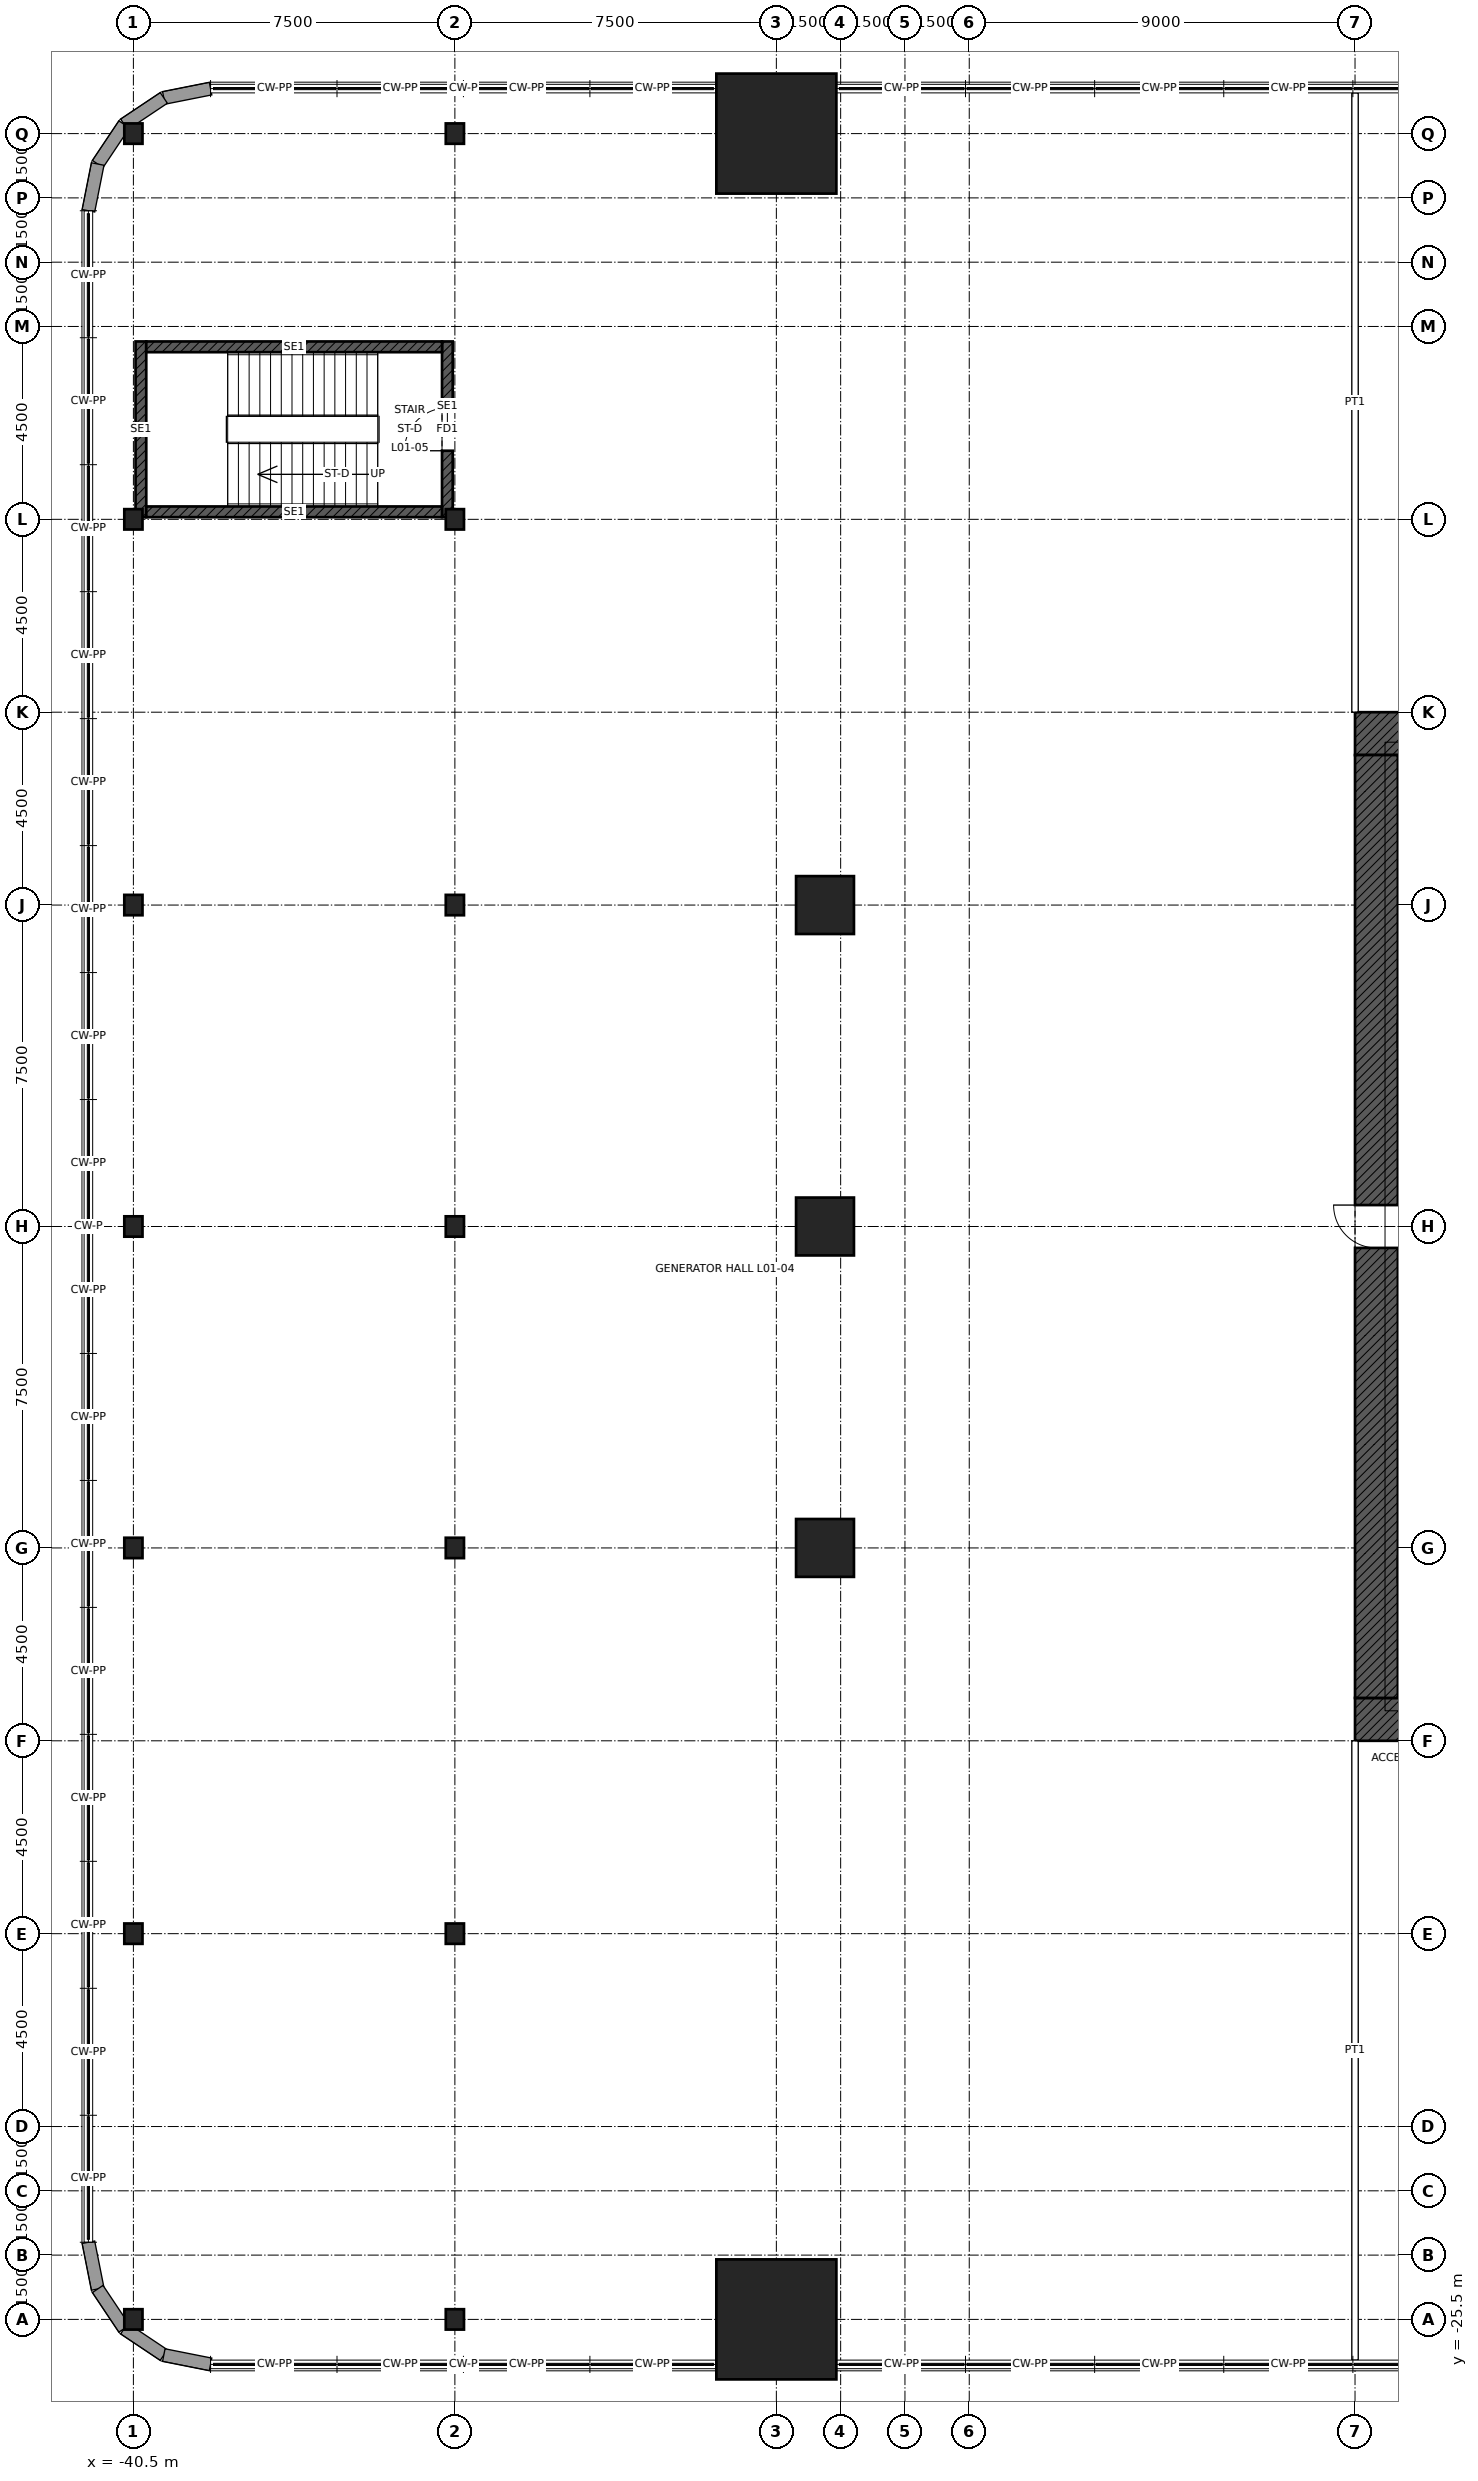
"""IFC4 building model, lengths in metres.
Left out: names, types, materials, properties, quantities, classifications, styles, units other than length and angle.
Written with IfcOpenShell. Run it as: python <this file> out.ifc"""

import sys

from ifc_helpers import new_model, si_unit, direction, frame, frame_2d, origin, origin_2d, place, context, subcontext, project, spatial, rectangle, hollow_rectangle, i_section, extrude, element, fill, save


model = new_model("IFC4")
c1 = context("Model", 3, precision=1e-05, world=origin(), true_north=direction((0.0, 1.0)))
c2 = subcontext(c1, "Body", "Model", "MODEL_VIEW")
j1 = project(units=[si_unit("LENGTHUNIT", "METRE"), si_unit("PLANEANGLEUNIT", "RADIAN")], contexts=[c1])
p1 = place(None, origin())
s1 = spatial("IfcSite", under=j1, at=p1, CompositionType="ELEMENT")
p2 = place(p1, origin())
s2 = spatial("IfcBuilding", under=s1, at=p2, CompositionType="ELEMENT")
p3 = place(p2, frame((0.0, 0.0, 7.2)))
s3 = spatial("IfcBuildingStorey", under=s2, at=p3, CompositionType="ELEMENT", Elevation=7.2)
for number, where, z_axis, x_axis in (
    (1, (-25.5, -25.5, 0.0), (0.0, 0.0, 1.0), (1.0, 0.0, 0.0)),
    (2, (-25.5, 25.5, 0.0), (0.0, 0.0, 1.0), (1.0, 0.0, 0.0)),
):
    element("IfcColumn", number, at=place(p3, frame(where, z_axis=z_axis, x_axis=x_axis)), inside=s3, PredefinedType="COLUMN", context=c2, shape_type="SweptSolid", body=[
        extrude(hollow_rectangle(XDim=2.8, YDim=2.8, WallThickness=0.14, at=origin_2d()), origin(), (0.0, 0.0, 1.0), 5.4),
    ])
for number, where, z_axis, x_axis in (
    (3, (-24.365, -7.5, 0.0), (0.0, 0.0, 1.0), (1.0, 0.0, 0.0)),
    (4, (-24.365, 0.0, 0.0), (0.0, 0.0, 1.0), (1.0, 0.0, 0.0)),
    (5, (-24.365, 7.5, 0.0), (0.0, 0.0, 1.0), (1.0, 0.0, 0.0)),
):
    element("IfcColumn", number, at=place(p3, frame(where, z_axis=z_axis, x_axis=x_axis)), inside=s3, PredefinedType="COLUMN", context=c2, shape_type="SweptSolid", body=[
        extrude(hollow_rectangle(XDim=1.35, YDim=1.35, WallThickness=0.1, at=origin_2d()), origin(), (0.0, 0.0, 1.0), 5.4),
    ])
for number, where, z_axis, x_axis in (
    (6, (-33.0, -25.5, 0.0), (0.0, 0.0, 1.0), (1.0, 0.0, 0.0)),
    (7, (-33.0, -16.5, 0.0), (0.0, 0.0, 1.0), (1.0, 0.0, 0.0)),
    (8, (-33.0, -7.5, 0.0), (0.0, 0.0, 1.0), (1.0, 0.0, 0.0)),
    (9, (-33.0, 0.0, 0.0), (0.0, 0.0, 1.0), (1.0, 0.0, 0.0)),
    (10, (-33.0, 7.5, 0.0), (0.0, 0.0, 1.0), (1.0, 0.0, 0.0)),
    (11, (-33.0, 16.5, 0.0), (0.0, 0.0, 1.0), (1.0, 0.0, 0.0)),
    (12, (-33.0, 25.5, 0.0), (0.0, 0.0, 1.0), (1.0, 0.0, 0.0)),
    (13, (-40.5, -25.5, 0.0), (0.0, 0.0, 1.0), (1.0, 0.0, 0.0)),
    (14, (-40.5, -16.5, 0.0), (0.0, 0.0, 1.0), (1.0, 0.0, 0.0)),
    (15, (-40.5, -7.5, 0.0), (0.0, 0.0, 1.0), (1.0, 0.0, 0.0)),
    (16, (-40.5, 0.0, 0.0), (0.0, 0.0, 1.0), (1.0, 0.0, 0.0)),
    (17, (-40.5, 7.5, 0.0), (0.0, 0.0, 1.0), (1.0, 0.0, 0.0)),
    (18, (-40.5, 16.5, 0.0), (0.0, 0.0, 1.0), (1.0, 0.0, 0.0)),
    (19, (-40.5, 25.5, 0.0), (0.0, 0.0, 1.0), (1.0, 0.0, 0.0)),
):
    element("IfcColumn", number, at=place(p3, frame(where, z_axis=z_axis, x_axis=x_axis)), inside=s3, PredefinedType="COLUMN", context=c2, shape_type="SweptSolid", body=[
        extrude(i_section(OverallWidth=0.424, OverallDepth=0.475, WebThickness=0.048, FlangeThickness=0.077, at=origin_2d()), origin(), (0.0, 0.0, 1.0), 5.4),
    ])
p4 = place(p3, frame((-12.0, 11.5, 0.0), z_axis=(0.0, 0.0, 1.0), x_axis=(1.0, 0.0, 0.0)))
e20 = element("IfcWall", 20, at=p4, inside=s3, PredefinedType="SHEAR", context=c2, shape_type="SweptSolid", body=[
    extrude(rectangle(XDim=24.0, YDim=1.0, at=frame_2d((12.0, 0.0))), origin(), (0.0, 0.0, 1.0), 5.4),
])
p5 = place(p4, frame((6.25, 0.0, 0.0)))
e21 = element("IfcOpeningElement", 21, at=p5, cuts=e20, PredefinedType="OPENING", context=c2, shape_type="SweptSolid", body=[
    extrude(rectangle(XDim=1.0, YDim=2.4, at=frame_2d((0.5, 1.2))), frame((0.0, 0.51, 0.0), z_axis=(0.0, -1.0, 0.0), x_axis=(1.0, 0.0, 0.0)), (0.0, 0.0, 1.0), 1.02),
])
p6 = place(p4, frame((16.75, 0.0, 0.0)))
e22 = element("IfcOpeningElement", 22, at=p6, cuts=e20, PredefinedType="OPENING", context=c2, shape_type="SweptSolid", body=[
    extrude(rectangle(XDim=1.0, YDim=2.4, at=frame_2d((0.5, 1.2))), frame((0.0, 0.51, 0.0), z_axis=(0.0, -1.0, 0.0), x_axis=(1.0, 0.0, 0.0)), (0.0, 0.0, 1.0), 1.02),
])
p7 = place(p3, frame((12.0, -11.5, 0.0), z_axis=(0.0, 0.0, 1.0), x_axis=(-1.0, 0.0, 0.0)))
e23 = element("IfcWall", 23, at=p7, inside=s3, PredefinedType="SHEAR", context=c2, shape_type="SweptSolid", body=[
    extrude(rectangle(XDim=24.0, YDim=1.0, at=frame_2d((12.0, 0.0))), origin(), (0.0, 0.0, 1.0), 5.4),
])
p8 = place(p7, frame((11.5, 0.0, 0.0)))
e24 = element("IfcOpeningElement", 24, at=p8, cuts=e23, PredefinedType="OPENING", context=c2, shape_type="SweptSolid", body=[
    extrude(rectangle(XDim=1.0, YDim=2.1, at=frame_2d((0.5, 1.05))), frame((0.0, 0.51, 0.0), z_axis=(0.0, -1.0, 0.0), x_axis=(1.0, 0.0, 0.0)), (0.0, 0.0, 1.0), 1.02),
])
p9 = place(p7, frame((1.0, 0.0, 0.0)))
e25 = element("IfcOpeningElement", 25, at=p9, cuts=e23, PredefinedType="OPENING", context=c2, shape_type="SweptSolid", body=[
    extrude(rectangle(XDim=1.0, YDim=2.4, at=frame_2d((0.5, 1.2))), frame((0.0, 0.51, 0.0), z_axis=(0.0, -1.0, 0.0), x_axis=(1.0, 0.0, 0.0)), (0.0, 0.0, 1.0), 1.02),
])
p10 = place(p3, frame((-11.5, -11.0, 0.0), z_axis=(0.0, 0.0, 1.0), x_axis=(0.0, 1.0, 0.0)))
e26 = element("IfcWall", 26, at=p10, inside=s3, PredefinedType="SHEAR", context=c2, shape_type="SweptSolid", body=[
    extrude(rectangle(XDim=22.0, YDim=1.0, at=frame_2d((11.0, 0.0))), origin(), (0.0, 0.0, 1.0), 5.4),
])
p11 = place(p10, frame((10.5, 0.0, 0.0)))
e27 = element("IfcOpeningElement", 27, at=p11, cuts=e26, PredefinedType="OPENING", context=c2, shape_type="SweptSolid", body=[
    extrude(rectangle(XDim=1.0, YDim=2.4, at=frame_2d((0.5, 1.2))), frame((0.0, 0.51, 0.0), z_axis=(0.0, -1.0, 0.0), x_axis=(1.0, 0.0, 0.0)), (0.0, 0.0, 1.0), 1.02),
])
for number, where, z_axis, x_axis in (
    (28, (-38.7, 26.55, 0.0), (0.0, 0.0, 1.0), (-0.981, -0.195, 0.0)),
    (29, (-39.791, 26.333, 0.0), (0.0, 0.0, 1.0), (-0.832, -0.555, 0.0)),
    (30, (-40.715, 25.715, 0.0), (0.0, 0.0, 1.0), (-0.555, -0.832, 0.0)),
    (31, (-41.333, 24.791, 0.0), (0.0, 0.0, 1.0), (-0.195, -0.981, 0.0)),
    (32, (-41.55, -23.7, 0.0), (0.0, 0.0, 1.0), (0.195, -0.981, 0.0)),
    (33, (-41.333, -24.791, 0.0), (0.0, 0.0, 1.0), (0.555, -0.832, 0.0)),
    (34, (-40.715, -25.715, 0.0), (0.0, 0.0, 1.0), (0.832, -0.555, 0.0)),
    (35, (-39.791, -26.333, 0.0), (0.0, 0.0, 1.0), (0.981, -0.195, 0.0)),
):
    element("IfcWall", number, at=place(p3, frame(where, z_axis=z_axis, x_axis=x_axis)), inside=s3, PredefinedType="SOLIDWALL", context=c2, shape_type="SweptSolid", body=[
        extrude(rectangle(XDim=1.112, YDim=0.3, at=frame_2d((0.556, 0.0))), origin(), (0.0, 0.0, 1.0), 5.15),
    ])
p12 = place(p3, frame((-12.0, 12.0, 0.0), z_axis=(0.0, 0.0, 1.0), x_axis=(0.0, 1.0, 0.0)))
e36 = element("IfcWall", 36, at=p12, inside=s3, PredefinedType="PARTITIONING", context=c2, shape_type="SweptSolid", body=[
    extrude(rectangle(XDim=14.45, YDim=0.15, at=frame_2d((7.225, 0.0))), origin(), (0.0, 0.0, 1.0), 4.109),
])
p13 = place(p3, frame((-12.0, -12.0, 0.0), z_axis=(0.0, 0.0, 1.0), x_axis=(0.0, -1.0, 0.0)))
e37 = element("IfcWall", 37, at=p13, inside=s3, PredefinedType="PARTITIONING", context=c2, shape_type="SweptSolid", body=[
    extrude(rectangle(XDim=14.45, YDim=0.15, at=frame_2d((7.225, 0.0))), origin(), (0.0, 0.0, 1.0), 5.15),
])
p14 = place(p3, frame((-40.325, 16.55, 0.0), z_axis=(0.0, 0.0, 1.0), x_axis=(0.0, 1.0, 0.0)))
e38 = element("IfcWall", 38, at=p14, inside=s3, PredefinedType="SOLIDWALL", context=c2, shape_type="SweptSolid", body=[
    extrude(rectangle(XDim=4.1, YDim=0.25, at=frame_2d((2.05, 0.0))), origin(), (0.0, 0.0, 1.0), 5.15),
])
p15 = place(p3, frame((-33.175, 16.55, 0.0), z_axis=(0.0, 0.0, 1.0), x_axis=(0.0, 1.0, 0.0)))
e39 = element("IfcWall", 39, at=p15, inside=s3, PredefinedType="SOLIDWALL", context=c2, shape_type="SweptSolid", body=[
    extrude(rectangle(XDim=4.1, YDim=0.25, at=frame_2d((2.05, 0.0))), origin(), (0.0, 0.0, 1.0), 5.15),
])
p16 = place(p15, frame((1.55, 0.0, 0.0)))
e40 = element("IfcOpeningElement", 40, at=p16, cuts=e39, PredefinedType="OPENING", context=c2, shape_type="SweptSolid", body=[
    extrude(rectangle(XDim=1.0, YDim=2.1, at=frame_2d((0.5, 1.05))), frame((0.0, 0.135, 0.0), z_axis=(0.0, -1.0, 0.0), x_axis=(1.0, 0.0, 0.0)), (0.0, 0.0, 1.0), 0.27),
])
for number, where, z_axis, x_axis in (
    (41, (-40.2, 16.675, 0.0), (0.0, 0.0, 1.0), (1.0, 0.0, 0.0)),
    (42, (-40.2, 20.525, 0.0), (0.0, 0.0, 1.0), (1.0, 0.0, 0.0)),
):
    element("IfcWall", number, at=place(p3, frame(where, z_axis=z_axis, x_axis=x_axis)), inside=s3, PredefinedType="SOLIDWALL", context=c2, shape_type="SweptSolid", body=[
        extrude(rectangle(XDim=6.9, YDim=0.25, at=frame_2d((3.45, 0.0))), origin(), (0.0, 0.0, 1.0), 5.15),
    ])
p17 = place(p11, origin())
e43 = element("IfcDoor", 43, at=p17, inside=s3, OperationType="SINGLE_SWING_RIGHT", PredefinedType="DOOR", context=c2, shape_type="SweptSolid", body=[
    extrude(rectangle(XDim=1.0, YDim=2.4, at=frame_2d((0.5, 1.2))), frame((0.0, 0.485, 0.0), z_axis=(0.0, -1.0, 0.0), x_axis=(1.0, 0.0, 0.0)), (0.0, 0.0, 1.0), 0.05),
])
fill(e27, e43)
p18 = place(p16, origin())
e44 = element("IfcDoor", 44, at=p18, inside=s3, OperationType="SINGLE_SWING_LEFT", PredefinedType="DOOR", context=c2, shape_type="SweptSolid", body=[
    extrude(rectangle(XDim=1.0, YDim=2.1, at=frame_2d((0.5, 1.05))), frame((0.0, 0.025, 0.0), z_axis=(0.0, -1.0, 0.0), x_axis=(1.0, 0.0, 0.0)), (0.0, 0.0, 1.0), 0.05),
])
fill(e40, e44)
save(model, sys.argv[1])
